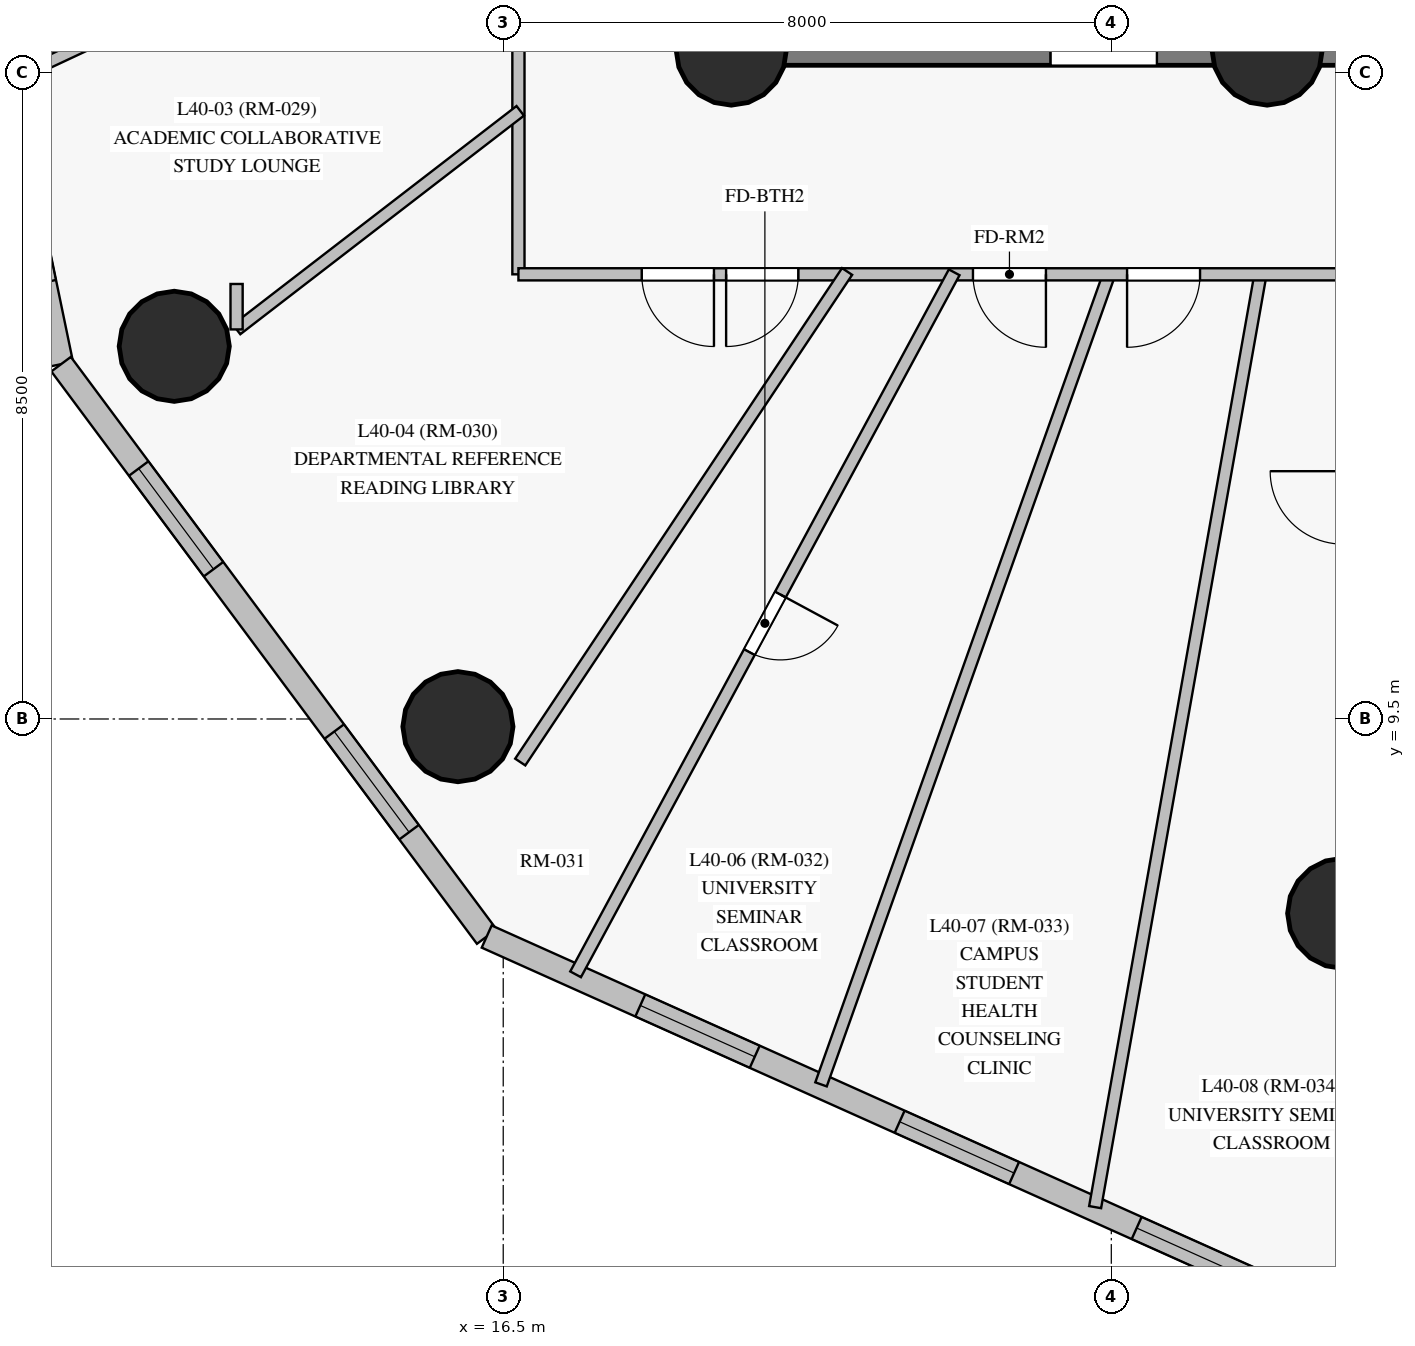
"""IFC4 building model, lengths in metres.
Left out: names, types, materials, properties, quantities, classifications, styles, units other than length and angle.
Written with IfcOpenShell. Run it as: python <this file> out.ifc"""

import sys

from ifc_helpers import new_model, si_unit, direction, frame, frame_2d, origin, origin_with_axes, origin_2d, place, context, subcontext, project, spatial, rectangle, circle, extrude, source, transform, mapped, element, fill, save


model = new_model("IFC4")
c1 = context("Model", 3, precision=1e-05, world=origin(), true_north=direction((0.0, 1.0)))
c2 = subcontext(c1, "Body", "Model", "MODEL_VIEW")
j1 = project(units=[si_unit("LENGTHUNIT", "METRE"), si_unit("PLANEANGLEUNIT", "RADIAN")], contexts=[c1])
p1 = place(None, origin())
s1 = spatial("IfcSite", under=j1, at=p1, CompositionType="ELEMENT")
p2 = place(p1, origin())
s2 = spatial("IfcBuilding", under=s1, at=p2, CompositionType="ELEMENT")
p3 = place(p2, frame((0.0, 0.0, 141.95)))
s3 = spatial("IfcBuildingStorey", under=s2, at=p3, CompositionType="ELEMENT", Elevation=141.95)
p4 = place(p3, frame((19.5, 18.3, 0.0), z_axis=(0.0, 0.0, 1.0), x_axis=(1.0, 0.0, 0.0)))
e1 = element("IfcWall", 1, at=p4, inside=s3, PredefinedType="SHEAR", context=c2, shape_type="SweptSolid", body=[
    extrude(rectangle(XDim=7.05, YDim=0.4, at=frame_2d((3.525, 0.0))), origin(), (0.0, 0.0, 1.0), 2.825),
])
p5 = place(p4, frame((4.2, 0.0, 0.0)))
e2 = element("IfcOpeningElement", 2, at=p5, cuts=e1, PredefinedType="OPENING", context=c2, shape_type="SweptSolid", body=[
    extrude(rectangle(XDim=1.4, YDim=2.2, at=frame_2d((0.7, 1.1))), frame((0.0, 0.21, 0.0), z_axis=(0.0, -1.0, 0.0), x_axis=(1.0, 0.0, 0.0)), (0.0, 0.0, 1.0), 0.42),
])
p6 = place(p3, frame((26.55, 18.3, 0.0), z_axis=(0.0, 0.0, 1.0), x_axis=(1.0, 0.0, 0.0)))
e3 = element("IfcWall", 3, at=p6, inside=s3, PredefinedType="SHEAR", context=c2, shape_type="SweptSolid", body=[
    extrude(rectangle(XDim=10.95, YDim=0.4, at=frame_2d((5.475, 0.0))), origin(), (0.0, 0.0, 1.0), 2.825),
])
p7 = place(p6, frame((4.55, 0.0, 0.0)))
e4 = element("IfcOpeningElement", 4, at=p7, cuts=e3, PredefinedType="OPENING", context=c2, shape_type="SweptSolid", body=[
    extrude(rectangle(XDim=1.4, YDim=2.2, at=frame_2d((0.7, 1.1))), frame((0.0, 0.21, 0.0), z_axis=(0.0, -1.0, 0.0), x_axis=(1.0, 0.0, 0.0)), (0.0, 0.0, 1.0), 0.42),
])
m1 = source(origin_with_axes(), c2, "Body", "SweptSolid", [
    extrude(circle(Radius=0.725, at=origin_2d()), origin(), (0.0, 0.0, 1.0), 3.05),
])
for number, where, z_axis, x_axis in (
    (5, (19.5, 18.3, 0.0), (0.0, 0.0, 1.0), (1.0, 0.0, 0.0)),
    (6, (26.55, 18.3, 0.0), (0.0, 0.0, 1.0), (1.0, 0.0, 0.0)),
    (7, (12.172, 14.403, 0.0), (0.0, 0.0, 1.0), (1.0, 0.0, 0.0)),
    (8, (15.904, 9.399, 0.0), (0.0, 0.0, 1.0), (1.0, 0.0, 0.0)),
    (9, (27.544, 6.943, 0.0), (0.0, 0.0, 1.0), (1.0, 0.0, 0.0)),
):
    element("IfcColumn", number, at=place(p3, frame(where, z_axis=z_axis, x_axis=x_axis)), inside=s3, PredefinedType="COLUMN", context=c2, shape_type="MappedRepresentation", body=[
        mapped(m1, transform((0.0, 0.0, 0.0), scale=1.0)),
    ])
p8 = place(p3, frame((7.927, 27.446, 0.0), z_axis=(0.0, 0.0, 1.0), x_axis=(0.203274097433, -0.979121872554, 0.0)))
e10 = element("IfcWall", 10, at=p8, inside=s3, PredefinedType="SOLIDWALL", context=c2, shape_type="SweptSolid", body=[
    extrude(rectangle(XDim=13.561, YDim=0.32, at=frame_2d((6.781, 0.0))), origin(), (0.0, 0.0, 1.0), 2.825),
])
p9 = place(p8, frame((2.426, 0.0, 0.85)))
e11 = element("IfcOpeningElement", 11, at=p9, cuts=e10, PredefinedType="OPENING", context=c2, shape_type="SweptSolid", body=[
    extrude(rectangle(XDim=1.65, YDim=1.65, at=frame_2d((0.825, 0.825))), frame((0.0, 0.17, 0.0), z_axis=(0.0, -1.0, 0.0), x_axis=(1.0, 0.0, 0.0)), (0.0, 0.0, 1.0), 0.34),
])
p10 = place(p8, frame((7.283, 0.0, 0.85)))
e12 = element("IfcOpeningElement", 12, at=p10, cuts=e10, PredefinedType="OPENING", context=c2, shape_type="SweptSolid", body=[
    extrude(rectangle(XDim=1.65, YDim=1.65, at=frame_2d((0.825, 0.825))), frame((0.0, 0.17, 0.0), z_axis=(0.0, -1.0, 0.0), x_axis=(1.0, 0.0, 0.0)), (0.0, 0.0, 1.0), 0.34),
])
p11 = place(p8, frame((10.813, 0.0, 0.85)))
e13 = element("IfcOpeningElement", 13, at=p11, cuts=e10, PredefinedType="OPENING", context=c2, shape_type="SweptSolid", body=[
    extrude(rectangle(XDim=1.65, YDim=1.65, at=frame_2d((0.825, 0.825))), frame((0.0, 0.17, 0.0), z_axis=(0.0, -1.0, 0.0), x_axis=(1.0, 0.0, 0.0)), (0.0, 0.0, 1.0), 0.34),
])
p12 = place(p3, frame((10.683, 14.168, 0.0), z_axis=(0.0, 0.0, 1.0), x_axis=(0.596714794235, -0.80245339699, 0.0)))
e14 = element("IfcWall", 14, at=p12, inside=s3, PredefinedType="SOLIDWALL", context=c2, shape_type="SweptSolid", body=[
    extrude(rectangle(XDim=9.384, YDim=0.32, at=frame_2d((4.692, 0.0))), origin(), (0.0, 0.0, 1.0), 2.825),
])
p13 = place(p12, frame((1.711, 0.0, 0.85)))
e15 = element("IfcOpeningElement", 15, at=p13, cuts=e14, PredefinedType="OPENING", context=c2, shape_type="SweptSolid", body=[
    extrude(rectangle(XDim=1.65, YDim=1.65, at=frame_2d((0.825, 0.825))), frame((0.0, 0.17, 0.0), z_axis=(0.0, -1.0, 0.0), x_axis=(1.0, 0.0, 0.0)), (0.0, 0.0, 1.0), 0.34),
])
p14 = place(p12, frame((6.023, 0.0, 0.85)))
e16 = element("IfcOpeningElement", 16, at=p14, cuts=e14, PredefinedType="OPENING", context=c2, shape_type="SweptSolid", body=[
    extrude(rectangle(XDim=1.65, YDim=1.65, at=frame_2d((0.825, 0.825))), frame((0.0, 0.17, 0.0), z_axis=(0.0, -1.0, 0.0), x_axis=(1.0, 0.0, 0.0)), (0.0, 0.0, 1.0), 0.34),
])
p15 = place(p3, frame((16.283, 6.638, 0.0), z_axis=(0.0, 0.0, 1.0), x_axis=(0.912466082441, -0.409152353524, 0.0)))
e17 = element("IfcWall", 17, at=p15, inside=s3, PredefinedType="SOLIDWALL", context=c2, shape_type="SweptSolid", body=[
    extrude(rectangle(XDim=11.701, YDim=0.32, at=frame_2d((5.851, 0.0))), origin(), (0.0, 0.0, 1.0), 2.825),
])
p16 = place(p15, frame((2.215, 0.0, 0.85)))
e18 = element("IfcOpeningElement", 18, at=p16, cuts=e17, PredefinedType="OPENING", context=c2, shape_type="SweptSolid", body=[
    extrude(rectangle(XDim=1.65, YDim=1.65, at=frame_2d((0.825, 0.825))), frame((0.0, 0.17, 0.0), z_axis=(0.0, -1.0, 0.0), x_axis=(1.0, 0.0, 0.0)), (0.0, 0.0, 1.0), 0.34),
])
p17 = place(p15, frame((5.954, 0.0, 0.85)))
e19 = element("IfcOpeningElement", 19, at=p17, cuts=e17, PredefinedType="OPENING", context=c2, shape_type="SweptSolid", body=[
    extrude(rectangle(XDim=1.65, YDim=1.65, at=frame_2d((0.825, 0.825))), frame((0.0, 0.17, 0.0), z_axis=(0.0, -1.0, 0.0), x_axis=(1.0, 0.0, 0.0)), (0.0, 0.0, 1.0), 0.34),
])
p18 = place(p15, frame((9.372, 0.0, 0.85)))
e20 = element("IfcOpeningElement", 20, at=p18, cuts=e17, PredefinedType="OPENING", context=c2, shape_type="SweptSolid", body=[
    extrude(rectangle(XDim=1.65, YDim=1.65, at=frame_2d((0.825, 0.825))), frame((0.0, 0.17, 0.0), z_axis=(0.0, -1.0, 0.0), x_axis=(1.0, 0.0, 0.0)), (0.0, 0.0, 1.0), 0.34),
])
p19 = place(p3, frame((26.96, 1.85, 0.0), z_axis=(0.0, 0.0, 1.0), x_axis=(0.953587787618, 0.301115146257, 0.0)))
e21 = element("IfcWall", 21, at=p19, inside=s3, PredefinedType="SOLIDWALL", context=c2, shape_type="SweptSolid", body=[
    extrude(rectangle(XDim=9.364, YDim=0.32, at=frame_2d((4.682, 0.0))), origin(), (0.0, 0.0, 1.0), 2.825),
])
p20 = place(p19, frame((2.856, 0.0, 0.85)))
e22 = element("IfcOpeningElement", 22, at=p20, cuts=e21, PredefinedType="OPENING", context=c2, shape_type="SweptSolid", body=[
    extrude(rectangle(XDim=1.65, YDim=1.65, at=frame_2d((0.825, 0.825))), frame((0.0, 0.17, 0.0), z_axis=(0.0, -1.0, 0.0), x_axis=(1.0, 0.0, 0.0)), (0.0, 0.0, 1.0), 0.34),
])
p21 = place(p19, frame((6.391, 0.0, 0.85)))
e23 = element("IfcOpeningElement", 23, at=p21, cuts=e21, PredefinedType="OPENING", context=c2, shape_type="SweptSolid", body=[
    extrude(rectangle(XDim=1.65, YDim=1.65, at=frame_2d((0.825, 0.825))), frame((0.0, 0.17, 0.0), z_axis=(0.0, -1.0, 0.0), x_axis=(1.0, 0.0, 0.0)), (0.0, 0.0, 1.0), 0.34),
])
p22 = place(p3, frame((16.7, 15.35, 0.0), z_axis=(0.0, 0.0, 1.0), x_axis=(0.0, 1.0, 0.0)))
e24 = element("IfcWall", 24, at=p22, inside=s3, PredefinedType="PARTITIONING", context=c2, shape_type="SweptSolid", body=[
    extrude(rectangle(XDim=22.3, YDim=0.16, at=frame_2d((11.15, 0.0))), origin(), (0.0, 0.0, 1.0), 2.225),
])
p23 = place(p22, frame((10.535, 0.0, 0.0)))
e25 = element("IfcOpeningElement", 25, at=p23, cuts=e24, PredefinedType="OPENING", context=c2, shape_type="SweptSolid", body=[
    extrude(rectangle(XDim=0.95, YDim=2.15, at=frame_2d((0.475, 1.075))), frame((0.0, 0.09, 0.0), z_axis=(0.0, -1.0, 0.0), x_axis=(1.0, 0.0, 0.0)), (0.0, 0.0, 1.0), 0.18),
])
p24 = place(p22, frame((6.221, 0.0, 0.0)))
e26 = element("IfcOpeningElement", 26, at=p24, cuts=e24, PredefinedType="OPENING", context=c2, shape_type="SweptSolid", body=[
    extrude(rectangle(XDim=0.96, YDim=2.15, at=frame_2d((0.48, 1.075))), frame((0.0, 0.09, 0.0), z_axis=(0.0, -1.0, 0.0), x_axis=(1.0, 0.0, 0.0)), (0.0, 0.0, 1.0), 0.18),
])
p25 = place(p22, frame((3.32, 0.0, 0.0)))
e27 = element("IfcOpeningElement", 27, at=p25, cuts=e24, PredefinedType="OPENING", context=c2, shape_type="SweptSolid", body=[
    extrude(rectangle(XDim=0.95, YDim=2.15, at=frame_2d((0.475, 1.075))), frame((0.0, 0.09, 0.0), z_axis=(0.0, -1.0, 0.0), x_axis=(1.0, 0.0, 0.0)), (0.0, 0.0, 1.0), 0.18),
])
p26 = place(p22, frame((18.328, 0.0, 0.0)))
e28 = element("IfcOpeningElement", 28, at=p26, cuts=e24, PredefinedType="OPENING", context=c2, shape_type="SweptSolid", body=[
    extrude(rectangle(XDim=0.95, YDim=2.15, at=frame_2d((0.475, 1.075))), frame((0.0, 0.09, 0.0), z_axis=(0.0, -1.0, 0.0), x_axis=(1.0, 0.0, 0.0)), (0.0, 0.0, 1.0), 0.18),
])
p27 = place(p22, frame((16.25, 0.0, 0.0)))
e29 = element("IfcOpeningElement", 29, at=p27, cuts=e24, PredefinedType="OPENING", context=c2, shape_type="SweptSolid", body=[
    extrude(rectangle(XDim=0.96, YDim=2.15, at=frame_2d((0.48, 1.075))), frame((0.0, 0.09, 0.0), z_axis=(0.0, -1.0, 0.0), x_axis=(1.0, 0.0, 0.0)), (0.0, 0.0, 1.0), 0.18),
])
p28 = place(p22, frame((13.38, 0.0, 0.0)))
e30 = element("IfcOpeningElement", 30, at=p28, cuts=e24, PredefinedType="OPENING", context=c2, shape_type="SweptSolid", body=[
    extrude(rectangle(XDim=0.96, YDim=2.15, at=frame_2d((0.48, 1.075))), frame((0.0, 0.09, 0.0), z_axis=(0.0, -1.0, 0.0), x_axis=(1.0, 0.0, 0.0)), (0.0, 0.0, 1.0), 0.18),
])
p29 = place(p3, frame((26.468, 15.379, 0.0), z_axis=(0.0, 0.0, 1.0), x_axis=(-0.174546687902, -0.984648898716, 0.0)))
e31 = element("IfcWall", 31, at=p29, inside=s3, PredefinedType="PARTITIONING", context=c2, shape_type="SweptSolid", body=[
    extrude(rectangle(XDim=12.493, YDim=0.16, at=frame_2d((6.247, 0.0))), origin(), (0.0, 0.0, 1.0), 2.225),
])
p30 = place(p3, frame((24.481, 15.378, 0.0), z_axis=(0.0, 0.0, 1.0), x_axis=(-0.335074645571, -0.942191584496, 0.0)))
e32 = element("IfcWall", 32, at=p30, inside=s3, PredefinedType="PARTITIONING", context=c2, shape_type="SweptSolid", body=[
    extrude(rectangle(XDim=11.341, YDim=0.16, at=frame_2d((5.67, 0.0))), origin(), (0.0, 0.0, 1.0), 2.825),
])
p31 = place(p3, frame((27.55, 15.35, 0.0), z_axis=(0.0, 0.0, 1.0), x_axis=(-1.0, 0.0, 0.0)))
e33 = element("IfcWall", 33, at=p31, inside=s3, PredefinedType="PARTITIONING", context=c2, shape_type="SweptSolid", body=[
    extrude(rectangle(XDim=10.85, YDim=0.16, at=frame_2d((5.425, 0.0))), origin(), (0.0, 0.0, 1.0), 2.325),
])
p32 = place(p31, frame((7.167, 0.0, 0.0)))
e34 = element("IfcOpeningElement", 34, at=p32, cuts=e33, PredefinedType="OPENING", context=c2, shape_type="SweptSolid", body=[
    extrude(rectangle(XDim=0.95, YDim=2.15, at=frame_2d((0.475, 1.075))), frame((0.0, 0.09, 0.0), z_axis=(0.0, -1.0, 0.0), x_axis=(1.0, 0.0, 0.0)), (0.0, 0.0, 1.0), 0.18),
])
p33 = place(p31, frame((3.91, 0.0, 0.0)))
e35 = element("IfcOpeningElement", 35, at=p33, cuts=e33, PredefinedType="OPENING", context=c2, shape_type="SweptSolid", body=[
    extrude(rectangle(XDim=0.96, YDim=2.15, at=frame_2d((0.48, 1.075))), frame((0.0, 0.09, 0.0), z_axis=(0.0, -1.0, 0.0), x_axis=(1.0, 0.0, 0.0)), (0.0, 0.0, 1.0), 0.18),
])
p34 = place(p31, frame((1.883, 0.0, 0.0)))
e36 = element("IfcOpeningElement", 36, at=p34, cuts=e33, PredefinedType="OPENING", context=c2, shape_type="SweptSolid", body=[
    extrude(rectangle(XDim=0.96, YDim=2.15, at=frame_2d((0.48, 1.075))), frame((0.0, 0.09, 0.0), z_axis=(0.0, -1.0, 0.0), x_axis=(1.0, 0.0, 0.0)), (0.0, 0.0, 1.0), 0.18),
])
p35 = place(p31, frame((8.278, 0.0, 0.0)))
e37 = element("IfcOpeningElement", 37, at=p35, cuts=e33, PredefinedType="OPENING", context=c2, shape_type="SweptSolid", body=[
    extrude(rectangle(XDim=0.95, YDim=2.15, at=frame_2d((0.475, 1.075))), frame((0.0, 0.09, 0.0), z_axis=(0.0, -1.0, 0.0), x_axis=(1.0, 0.0, 0.0)), (0.0, 0.0, 1.0), 0.18),
])
p36 = place(p3, frame((22.433, 15.376, 0.0), z_axis=(0.0, 0.0, 1.0), x_axis=(-0.474668589789, -0.880164603849, 0.0)))
e38 = element("IfcWall", 38, at=p36, inside=s3, PredefinedType="PARTITIONING", context=c2, shape_type="SweptSolid", body=[
    extrude(rectangle(XDim=10.493, YDim=0.16, at=frame_2d((5.247, 0.0))), origin(), (0.0, 0.0, 1.0), 2.825),
])
p37 = place(p36, frame((4.816, 0.0, 0.0)))
e39 = element("IfcOpeningElement", 39, at=p37, cuts=e38, PredefinedType="OPENING", context=c2, shape_type="SweptSolid", body=[
    extrude(rectangle(XDim=0.86, YDim=2.04, at=frame_2d((0.43, 1.02))), frame((0.0, 0.09, 0.0), z_axis=(0.0, -1.0, 0.0), x_axis=(1.0, 0.0, 0.0)), (0.0, 0.0, 1.0), 0.18),
])
p38 = place(p3, frame((21.024, 15.387, 0.0), z_axis=(0.0, 0.0, 1.0), x_axis=(-0.554453162651, -0.832214930427, 0.0)))
e40 = element("IfcWall", 40, at=p38, inside=s3, PredefinedType="PARTITIONING", context=c2, shape_type="SweptSolid", body=[
    extrude(rectangle(XDim=7.755, YDim=0.16, at=frame_2d((3.877, 0.0))), origin(), (0.0, 0.0, 1.0), 2.825),
])
p39 = place(p3, frame((16.741, 21.058, 0.0), z_axis=(0.0, 0.0, 1.0), x_axis=(-0.905560826744, -0.424216441296, 0.0)))
e41 = element("IfcWall", 41, at=p39, inside=s3, PredefinedType="PARTITIONING", context=c2, shape_type="SweptSolid", body=[
    extrude(rectangle(XDim=7.509, YDim=0.16, at=frame_2d((3.754, 0.0))), origin(), (0.0, 0.0, 1.0), 2.825),
])
p40 = place(p3, frame((16.724, 17.501, 0.0), z_axis=(0.0, 0.0, 1.0), x_axis=(-0.792109367108, -0.610379185867, 0.0)))
e42 = element("IfcWall", 42, at=p40, inside=s3, PredefinedType="PARTITIONING", context=c2, shape_type="SweptSolid", body=[
    extrude(rectangle(XDim=4.711, YDim=0.16, at=frame_2d((2.356, 0.0))), origin(), (0.0, 0.0, 1.0), 2.225),
])
p41 = place(p3, frame((12.992, 14.625, 0.0), z_axis=(0.0, 0.0, 1.0), x_axis=(0.0, 1.0, 0.0)))
e43 = element("IfcWall", 43, at=p41, inside=s3, PredefinedType="PARTITIONING", context=c2, shape_type="SweptSolid", body=[
    extrude(rectangle(XDim=0.598, YDim=0.16, at=frame_2d((0.299, 0.0))), origin(), (0.0, 0.0, 1.0), 2.825),
])
m2 = source(origin_with_axes(), c2, "Body", "SweptSolid", [
    extrude(rectangle(XDim=1.65, YDim=1.65, at=frame_2d((0.825, 0.825))), frame((0.0, 0.03, 0.0), z_axis=(0.0, -1.0, 0.0), x_axis=(1.0, 0.0, 0.0)), (0.0, 0.0, 1.0), 0.06),
])
p42 = place(p13, origin())
e44 = element("IfcWindow", 44, at=p42, inside=s3, PartitioningType="SINGLE_PANEL", PredefinedType="WINDOW", context=c2, shape_type="MappedRepresentation", body=[
    mapped(m2, transform((0.0, 0.0, 0.0), scale=1.0)),
])
fill(e15, e44)
p43 = place(p14, origin())
e45 = element("IfcWindow", 45, at=p43, inside=s3, PartitioningType="SINGLE_PANEL", PredefinedType="WINDOW", context=c2, shape_type="MappedRepresentation", body=[
    mapped(m2, transform((0.0, 0.0, 0.0), scale=1.0)),
])
fill(e16, e45)
p44 = place(p16, origin())
e46 = element("IfcWindow", 46, at=p44, inside=s3, PartitioningType="SINGLE_PANEL", PredefinedType="WINDOW", context=c2, shape_type="MappedRepresentation", body=[
    mapped(m2, transform((0.0, 0.0, 0.0), scale=1.0)),
])
fill(e18, e46)
p45 = place(p17, origin())
e47 = element("IfcWindow", 47, at=p45, inside=s3, PartitioningType="SINGLE_PANEL", PredefinedType="WINDOW", context=c2, shape_type="MappedRepresentation", body=[
    mapped(m2, transform((0.0, 0.0, 0.0), scale=1.0)),
])
fill(e19, e47)
p46 = place(p18, origin())
e48 = element("IfcWindow", 48, at=p46, inside=s3, PartitioningType="SINGLE_PANEL", PredefinedType="WINDOW", context=c2, shape_type="MappedRepresentation", body=[
    mapped(m2, transform((0.0, 0.0, 0.0), scale=1.0)),
])
fill(e20, e48)
m3 = source(origin_with_axes(), c2, "Body", "SweptSolid", [
    extrude(rectangle(XDim=0.95, YDim=2.15, at=frame_2d((0.475, 1.075))), frame((0.0, 0.025, 0.0), z_axis=(0.0, -1.0, 0.0), x_axis=(1.0, 0.0, 0.0)), (0.0, 0.0, 1.0), 0.05),
])
p47 = place(p32, origin())
e49 = element("IfcDoor", 49, at=p47, inside=s3, OperationType="SINGLE_SWING_RIGHT", PredefinedType="DOOR", context=c2, shape_type="MappedRepresentation", body=[
    mapped(m3, transform((0.0, 0.0, 0.0), scale=1.0)),
])
fill(e34, e49)
m4 = source(origin_with_axes(), c2, "Body", "SweptSolid", [
    extrude(rectangle(XDim=0.96, YDim=2.15, at=frame_2d((0.48, 1.075))), frame((0.0, 0.025, 0.0), z_axis=(0.0, -1.0, 0.0), x_axis=(1.0, 0.0, 0.0)), (0.0, 0.0, 1.0), 0.05),
])
p48 = place(p33, origin())
e50 = element("IfcDoor", 50, at=p48, inside=s3, OperationType="SINGLE_SWING_LEFT", PredefinedType="DOOR", context=c2, shape_type="MappedRepresentation", body=[
    mapped(m4, transform((0.0, 0.0, 0.0), scale=1.0)),
])
fill(e35, e50)
p49 = place(p34, origin())
e51 = element("IfcDoor", 51, at=p49, inside=s3, OperationType="SINGLE_SWING_RIGHT", PredefinedType="DOOR", context=c2, shape_type="MappedRepresentation", body=[
    mapped(m4, transform((0.0, 0.0, 0.0), scale=1.0)),
])
fill(e36, e51)
p50 = place(p35, origin())
e52 = element("IfcDoor", 52, at=p50, inside=s3, OperationType="SINGLE_SWING_LEFT", PredefinedType="DOOR", context=c2, shape_type="MappedRepresentation", body=[
    mapped(m3, transform((0.0, 0.0, 0.0), scale=1.0)),
])
fill(e37, e52)
m5 = source(origin_with_axes(), c2, "Body", "SweptSolid", [
    extrude(rectangle(XDim=0.86, YDim=2.04, at=frame_2d((0.43, 1.02))), frame((0.0, 0.025, 0.0), z_axis=(0.0, -1.0, 0.0), x_axis=(1.0, 0.0, 0.0)), (0.0, 0.0, 1.0), 0.05),
])
p51 = place(p37, origin())
e53 = element("IfcDoor", 53, at=p51, inside=s3, OperationType="SINGLE_SWING_LEFT", PredefinedType="DOOR", context=c2, shape_type="MappedRepresentation", body=[
    mapped(m5, transform((0.0, 0.0, 0.0), scale=1.0)),
])
fill(e39, e53)
save(model, sys.argv[1])
